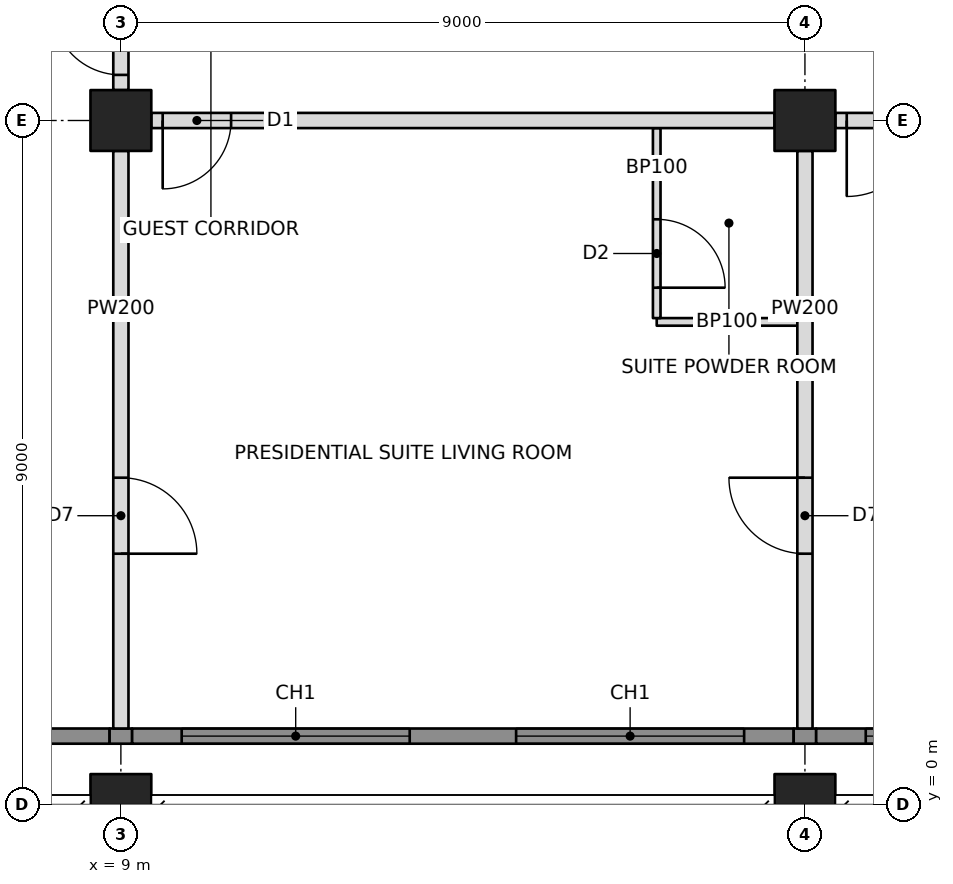
"""IFC4 building model, lengths in metres.
Left out: names, types, materials, properties, quantities, classifications, styles, units other than length and angle.
Written with IfcOpenShell. Run it as: python <this file> out.ifc"""

import sys

from ifc_helpers import new_model, si_unit, direction, frame, frame_2d, origin, origin_2d, place, context, subcontext, project, spatial, rectangle, hollow_rectangle, extrude, element, fill, save


model = new_model("IFC4")
c1 = context("Model", 3, precision=1e-05, world=origin(), true_north=direction((0.0, 1.0)))
c2 = subcontext(c1, "Body", "Model", "MODEL_VIEW")
j1 = project(units=[si_unit("LENGTHUNIT", "METRE"), si_unit("PLANEANGLEUNIT", "RADIAN")], contexts=[c1])
p1 = place(None, origin())
s1 = spatial("IfcSite", under=j1, at=p1, CompositionType="ELEMENT")
p2 = place(p1, origin())
s2 = spatial("IfcBuilding", under=s1, at=p2, CompositionType="ELEMENT")
p3 = place(p2, frame((0.0, 0.0, 266.2)))
s3 = spatial("IfcBuildingStorey", under=s2, at=p3, CompositionType="ELEMENT", Elevation=266.2)
for number, where, z_axis, x_axis in (
    (1, (9.0, 0.0, 0.0), (0.0, 0.0, 1.0), (1.0, 0.0, 0.0)),
    (2, (9.0, 9.0, 0.0), (0.0, 0.0, 1.0), (1.0, 0.0, 0.0)),
    (3, (18.0, 0.0, 0.0), (0.0, 0.0, 1.0), (1.0, 0.0, 0.0)),
    (4, (18.0, 9.0, 0.0), (0.0, 0.0, 1.0), (1.0, 0.0, 0.0)),
):
    element("IfcColumn", number, at=place(p3, frame(where, z_axis=z_axis, x_axis=x_axis)), inside=s3, PredefinedType="COLUMN", context=c2, shape_type="SweptSolid", body=[
        extrude(hollow_rectangle(XDim=0.8, YDim=0.8, WallThickness=0.032, at=origin_2d()), origin(), (0.0, 0.0, 1.0), 3.6),
    ])
p4 = place(p3, frame((3.0, 0.9, 0.0), z_axis=(0.0, 0.0, 1.0), x_axis=(1.0, 0.0, 0.0)))
e5 = element("IfcWall", 5, at=p4, inside=s3, PredefinedType="SOLIDWALL", context=c2, shape_type="SweptSolid", body=[
    extrude(rectangle(XDim=5.852, YDim=0.2, at=frame_2d((2.926, 0.0))), origin(), (0.0, 0.0, 1.0), 3.35),
])
p5 = place(p4, frame((1.45, 0.0, 0.6)))
e6 = element("IfcOpeningElement", 6, at=p5, cuts=e5, PredefinedType="OPENING", context=c2, shape_type="SweptSolid", body=[
    extrude(rectangle(XDim=3.0, YDim=2.2, at=frame_2d((1.5, 1.1))), frame((0.0, 0.11, 0.0), z_axis=(0.0, -1.0, 0.0), x_axis=(1.0, 0.0, 0.0)), (0.0, 0.0, 1.0), 0.22),
])
p6 = place(p3, frame((9.4, 9.0, 0.0), z_axis=(0.0, 0.0, 1.0), x_axis=(1.0, 0.0, 0.0)))
e7 = element("IfcWall", 7, at=p6, inside=s3, PredefinedType="PARTITIONING", context=c2, shape_type="SweptSolid", body=[
    extrude(rectangle(XDim=8.2, YDim=0.2, at=frame_2d((4.1, 0.0))), origin(), (0.0, 0.0, 1.0), 2.491),
])
p7 = place(p6, frame((0.15, 0.0, 0.0)))
e8 = element("IfcOpeningElement", 8, at=p7, cuts=e7, PredefinedType="OPENING", context=c2, shape_type="SweptSolid", body=[
    extrude(rectangle(XDim=0.9, YDim=2.1, at=frame_2d((0.45, 1.05))), frame((0.0, 0.11, 0.0), z_axis=(0.0, -1.0, 0.0), x_axis=(1.0, 0.0, 0.0)), (0.0, 0.0, 1.0), 0.22),
])
p8 = place(p3, frame((18.4, 9.0, 0.0), z_axis=(0.0, 0.0, 1.0), x_axis=(1.0, 0.0, 0.0)))
e9 = element("IfcWall", 9, at=p8, inside=s3, PredefinedType="PARTITIONING", context=c2, shape_type="SweptSolid", body=[
    extrude(rectangle(XDim=8.2, YDim=0.2, at=frame_2d((4.1, 0.0))), origin(), (0.0, 0.0, 1.0), 2.491),
])
p9 = place(p8, frame((0.15, 0.0, 0.0)))
e10 = element("IfcOpeningElement", 10, at=p9, cuts=e9, PredefinedType="OPENING", context=c2, shape_type="SweptSolid", body=[
    extrude(rectangle(XDim=1.0, YDim=2.1, at=frame_2d((0.5, 1.05))), frame((0.0, 0.11, 0.0), z_axis=(0.0, -1.0, 0.0), x_axis=(1.0, 0.0, 0.0)), (0.0, 0.0, 1.0), 0.22),
])
p10 = place(p3, frame((9.0, 8.6, 0.0), z_axis=(0.0, 0.0, 1.0), x_axis=(0.0, -1.0, 0.0)))
e11 = element("IfcWall", 11, at=p10, inside=s3, PredefinedType="PARTITIONING", context=c2, shape_type="SweptSolid", body=[
    extrude(rectangle(XDim=7.6, YDim=0.2, at=frame_2d((3.8, 0.0))), origin(), (0.0, 0.0, 1.0), 2.491),
])
p11 = place(p10, frame((4.3, 0.0, 0.0)))
e12 = element("IfcOpeningElement", 12, at=p11, cuts=e11, PredefinedType="OPENING", context=c2, shape_type="SweptSolid", body=[
    extrude(rectangle(XDim=1.0, YDim=2.1, at=frame_2d((0.5, 1.05))), frame((0.0, 0.11, 0.0), z_axis=(0.0, -1.0, 0.0), x_axis=(1.0, 0.0, 0.0)), (0.0, 0.0, 1.0), 0.22),
])
p12 = place(p3, frame((18.0, 8.6, 0.0), z_axis=(0.0, 0.0, 1.0), x_axis=(0.0, -1.0, 0.0)))
e13 = element("IfcWall", 13, at=p12, inside=s3, PredefinedType="PARTITIONING", context=c2, shape_type="SweptSolid", body=[
    extrude(rectangle(XDim=7.6, YDim=0.2, at=frame_2d((3.8, 0.0))), origin(), (0.0, 0.0, 1.0), 2.491),
])
p13 = place(p12, frame((4.3, 0.0, 0.0)))
e14 = element("IfcOpeningElement", 14, at=p13, cuts=e13, PredefinedType="OPENING", context=c2, shape_type="SweptSolid", body=[
    extrude(rectangle(XDim=1.0, YDim=2.1, at=frame_2d((0.5, 1.05))), frame((0.0, 0.11, 0.0), z_axis=(0.0, -1.0, 0.0), x_axis=(1.0, 0.0, 0.0)), (0.0, 0.0, 1.0), 0.22),
])
p14 = place(p3, frame((16.05, 6.35, 0.0), z_axis=(0.0, 0.0, 1.0), x_axis=(1.0, 0.0, 0.0)))
e15 = element("IfcWall", 15, at=p14, inside=s3, PredefinedType="PARTITIONING", context=c2, shape_type="SweptSolid", body=[
    extrude(rectangle(XDim=1.85, YDim=0.1, at=frame_2d((0.925, 0.0))), origin(), (0.0, 0.0, 1.0), 2.491),
])
p15 = place(p3, frame((16.05, 8.9, 0.0), z_axis=(0.0, 0.0, 1.0), x_axis=(0.0, -1.0, 0.0)))
e16 = element("IfcWall", 16, at=p15, inside=s3, PredefinedType="PARTITIONING", context=c2, shape_type="SweptSolid", body=[
    extrude(rectangle(XDim=2.5, YDim=0.1, at=frame_2d((1.25, 0.0))), origin(), (0.0, 0.0, 1.0), 2.491),
])
p16 = place(p15, frame((1.2, 0.0, 0.0)))
e17 = element("IfcOpeningElement", 17, at=p16, cuts=e16, PredefinedType="OPENING", context=c2, shape_type="SweptSolid", body=[
    extrude(rectangle(XDim=0.9, YDim=2.1, at=frame_2d((0.45, 1.05))), frame((0.0, 0.06, 0.0), z_axis=(0.0, -1.0, 0.0), x_axis=(1.0, 0.0, 0.0)), (0.0, 0.0, 1.0), 0.12),
])
p17 = place(p3, frame((9.0, 9.4, 0.0), z_axis=(0.0, 0.0, 1.0), x_axis=(0.0, 1.0, 0.0)))
e18 = element("IfcWall", 18, at=p17, inside=s3, PredefinedType="PARTITIONING", context=c2, shape_type="SweptSolid", body=[
    extrude(rectangle(XDim=1.3, YDim=0.2, at=frame_2d((0.65, 0.0))), origin(), (0.0, 0.0, 1.0), 2.491),
])
p18 = place(p17, frame((0.2, 0.0, 0.0)))
e19 = element("IfcOpeningElement", 19, at=p18, cuts=e18, PredefinedType="OPENING", context=c2, shape_type="SweptSolid", body=[
    extrude(rectangle(XDim=0.9, YDim=2.1, at=frame_2d((0.45, 1.05))), frame((0.0, 0.11, 0.0), z_axis=(0.0, -1.0, 0.0), x_axis=(1.0, 0.0, 0.0)), (0.0, 0.0, 1.0), 0.22),
])
p19 = place(p3, frame((8.852, 0.9, 0.0), z_axis=(0.0, 0.0, 1.0), x_axis=(1.0, 0.0, 0.0)))
e20 = element("IfcWall", 20, at=p19, inside=s3, PredefinedType="SOLIDWALL", context=c2, shape_type="SweptSolid", body=[
    extrude(rectangle(XDim=0.296, YDim=0.2, at=frame_2d((0.148, 0.0))), origin(), (0.0, 0.0, 1.0), 2.491),
])
p20 = place(p3, frame((9.148, 0.9, 0.0), z_axis=(0.0, 0.0, 1.0), x_axis=(1.0, 0.0, 0.0)))
e21 = element("IfcWall", 21, at=p20, inside=s3, PredefinedType="SOLIDWALL", context=c2, shape_type="SweptSolid", body=[
    extrude(rectangle(XDim=8.704, YDim=0.2, at=frame_2d((4.352, 0.0))), origin(), (0.0, 0.0, 1.0), 3.35),
])
p21 = place(p20, frame((0.652, 0.0, 0.6)))
e22 = element("IfcOpeningElement", 22, at=p21, cuts=e21, PredefinedType="OPENING", context=c2, shape_type="SweptSolid", body=[
    extrude(rectangle(XDim=3.0, YDim=2.2, at=frame_2d((1.5, 1.1))), frame((0.0, 0.11, 0.0), z_axis=(0.0, -1.0, 0.0), x_axis=(1.0, 0.0, 0.0)), (0.0, 0.0, 1.0), 0.22),
])
p22 = place(p20, frame((5.052, 0.0, 0.6)))
e23 = element("IfcOpeningElement", 23, at=p22, cuts=e21, PredefinedType="OPENING", context=c2, shape_type="SweptSolid", body=[
    extrude(rectangle(XDim=3.0, YDim=2.2, at=frame_2d((1.5, 1.1))), frame((0.0, 0.11, 0.0), z_axis=(0.0, -1.0, 0.0), x_axis=(1.0, 0.0, 0.0)), (0.0, 0.0, 1.0), 0.22),
])
p23 = place(p3, frame((17.852, 0.9, 0.0), z_axis=(0.0, 0.0, 1.0), x_axis=(1.0, 0.0, 0.0)))
e24 = element("IfcWall", 24, at=p23, inside=s3, PredefinedType="SOLIDWALL", context=c2, shape_type="SweptSolid", body=[
    extrude(rectangle(XDim=0.296, YDim=0.2, at=frame_2d((0.148, 0.0))), origin(), (0.0, 0.0, 1.0), 2.491),
])
p24 = place(p3, frame((18.148, 0.9, 0.0), z_axis=(0.0, 0.0, 1.0), x_axis=(1.0, 0.0, 0.0)))
e25 = element("IfcWall", 25, at=p24, inside=s3, PredefinedType="SOLIDWALL", context=c2, shape_type="SweptSolid", body=[
    extrude(rectangle(XDim=8.704, YDim=0.2, at=frame_2d((4.352, 0.0))), origin(), (0.0, 0.0, 1.0), 3.35),
])
p25 = place(p24, frame((0.652, 0.0, 0.6)))
e26 = element("IfcOpeningElement", 26, at=p25, cuts=e25, PredefinedType="OPENING", context=c2, shape_type="SweptSolid", body=[
    extrude(rectangle(XDim=3.0, YDim=2.2, at=frame_2d((1.5, 1.1))), frame((0.0, 0.11, 0.0), z_axis=(0.0, -1.0, 0.0), x_axis=(1.0, 0.0, 0.0)), (0.0, 0.0, 1.0), 0.22),
])
p26 = place(p24, frame((5.052, 0.0, 0.6)))
e27 = element("IfcOpeningElement", 27, at=p26, cuts=e25, PredefinedType="OPENING", context=c2, shape_type="SweptSolid", body=[
    extrude(rectangle(XDim=3.0, YDim=2.2, at=frame_2d((1.5, 1.1))), frame((0.0, 0.11, 0.0), z_axis=(0.0, -1.0, 0.0), x_axis=(1.0, 0.0, 0.0)), (0.0, 0.0, 1.0), 0.22),
])
p27 = place(p21, origin())
e28 = element("IfcWindow", 28, at=p27, inside=s3, PartitioningType="TRIPLE_PANEL_VERTICAL", PredefinedType="WINDOW", context=c2, shape_type="SweptSolid", body=[
    extrude(rectangle(XDim=3.0, YDim=2.2, at=frame_2d((1.5, 1.1))), frame((0.0, 0.03, 0.0), z_axis=(0.0, -1.0, 0.0), x_axis=(1.0, 0.0, 0.0)), (0.0, 0.0, 1.0), 0.06),
])
fill(e22, e28)
p28 = place(p22, origin())
e29 = element("IfcWindow", 29, at=p28, inside=s3, PartitioningType="TRIPLE_PANEL_VERTICAL", PredefinedType="WINDOW", context=c2, shape_type="SweptSolid", body=[
    extrude(rectangle(XDim=3.0, YDim=2.2, at=frame_2d((1.5, 1.1))), frame((0.0, 0.03, 0.0), z_axis=(0.0, -1.0, 0.0), x_axis=(1.0, 0.0, 0.0)), (0.0, 0.0, 1.0), 0.06),
])
fill(e23, e29)
p29 = place(p25, origin())
e30 = element("IfcWindow", 30, at=p29, inside=s3, PartitioningType="TRIPLE_PANEL_VERTICAL", PredefinedType="WINDOW", context=c2, shape_type="SweptSolid", body=[
    extrude(rectangle(XDim=3.0, YDim=2.2, at=frame_2d((1.5, 1.1))), frame((0.0, 0.03, 0.0), z_axis=(0.0, -1.0, 0.0), x_axis=(1.0, 0.0, 0.0)), (0.0, 0.0, 1.0), 0.06),
])
fill(e26, e30)
p30 = place(p11, origin())
e31 = element("IfcDoor", 31, at=p30, inside=s3, OperationType="SINGLE_SWING_RIGHT", PredefinedType="DOOR", context=c2, shape_type="SweptSolid", body=[
    extrude(rectangle(XDim=1.0, YDim=2.1, at=frame_2d((0.5, 1.05))), frame((0.0, 0.025, 0.0), z_axis=(0.0, -1.0, 0.0), x_axis=(1.0, 0.0, 0.0)), (0.0, 0.0, 1.0), 0.05),
])
fill(e12, e31)
p31 = place(p13, frame((1.0, 0.0, 0.0), z_axis=(0.0, 0.0, 1.0), x_axis=(-1.0, 0.0, 0.0)))
e32 = element("IfcDoor", 32, at=p31, inside=s3, OperationType="SINGLE_SWING_RIGHT", PredefinedType="DOOR", context=c2, shape_type="SweptSolid", body=[
    extrude(rectangle(XDim=1.0, YDim=2.1, at=frame_2d((0.5, 1.05))), frame((0.0, 0.025, 0.0), z_axis=(0.0, -1.0, 0.0), x_axis=(1.0, 0.0, 0.0)), (0.0, 0.0, 1.0), 0.05),
])
fill(e14, e32)
p32 = place(p16, origin())
e33 = element("IfcDoor", 33, at=p32, inside=s3, OperationType="SINGLE_SWING_RIGHT", PredefinedType="DOOR", context=c2, shape_type="SweptSolid", body=[
    extrude(rectangle(XDim=0.9, YDim=2.1, at=frame_2d((0.45, 1.05))), frame((0.0, 0.025, 0.0), z_axis=(0.0, -1.0, 0.0), x_axis=(1.0, 0.0, 0.0)), (0.0, 0.0, 1.0), 0.05),
])
fill(e17, e33)
p33 = place(p7, frame((0.9, 0.0, 0.0), z_axis=(0.0, 0.0, 1.0), x_axis=(-1.0, 0.0, 0.0)))
e34 = element("IfcDoor", 34, at=p33, inside=s3, OperationType="SINGLE_SWING_RIGHT", PredefinedType="DOOR", context=c2, shape_type="SweptSolid", body=[
    extrude(rectangle(XDim=0.9, YDim=2.1, at=frame_2d((0.45, 1.05))), frame((0.0, 0.025, 0.0), z_axis=(0.0, -1.0, 0.0), x_axis=(1.0, 0.0, 0.0)), (0.0, 0.0, 1.0), 0.05),
])
fill(e8, e34)
p34 = place(p9, frame((1.0, 0.0, 0.0), z_axis=(0.0, 0.0, 1.0), x_axis=(-1.0, 0.0, 0.0)))
e35 = element("IfcDoor", 35, at=p34, inside=s3, OperationType="SINGLE_SWING_RIGHT", PredefinedType="DOOR", context=c2, shape_type="SweptSolid", body=[
    extrude(rectangle(XDim=1.0, YDim=2.1, at=frame_2d((0.5, 1.05))), frame((0.0, 0.025, 0.0), z_axis=(0.0, -1.0, 0.0), x_axis=(1.0, 0.0, 0.0)), (0.0, 0.0, 1.0), 0.05),
])
fill(e10, e35)
p35 = place(p18, origin())
e36 = element("IfcDoor", 36, at=p35, inside=s3, OperationType="SINGLE_SWING_RIGHT", PredefinedType="DOOR", context=c2, shape_type="SweptSolid", body=[
    extrude(rectangle(XDim=0.9, YDim=2.1, at=frame_2d((0.45, 1.05))), frame((0.0, 0.025, 0.0), z_axis=(0.0, -1.0, 0.0), x_axis=(1.0, 0.0, 0.0)), (0.0, 0.0, 1.0), 0.05),
])
fill(e19, e36)
save(model, sys.argv[1])
